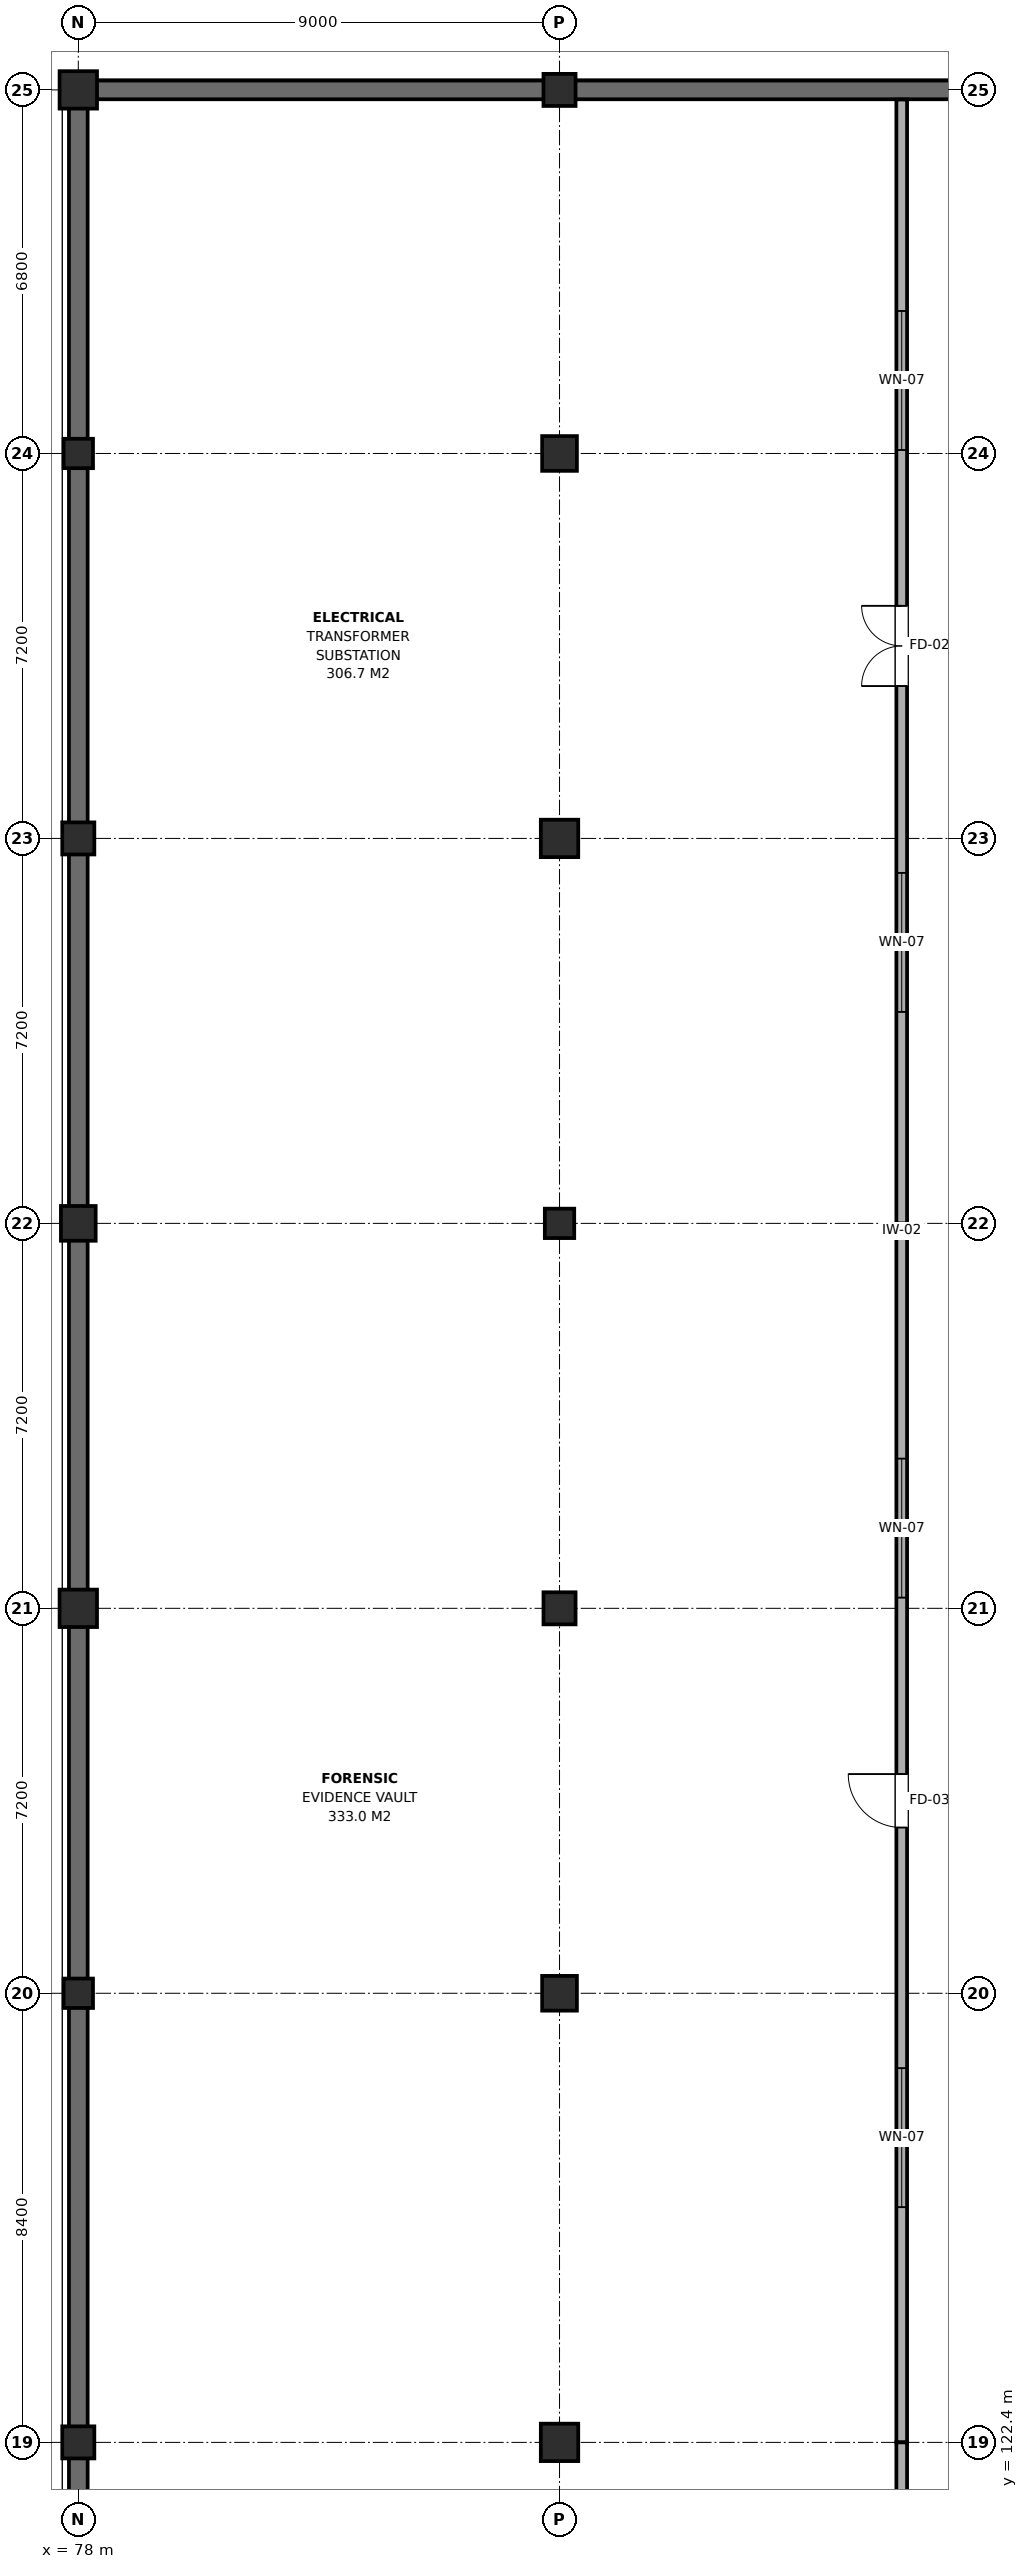
"""IFC4 building model, lengths in metres.
Left out: names, types, materials, properties, quantities, classifications, styles, units other than length and angle.
Written with IfcOpenShell. Run it as: python <this file> out.ifc"""

import sys

from ifc_helpers import new_model, si_unit, direction, frame, frame_2d, origin, origin_2d, place, context, subcontext, project, spatial, rectangle, extrude, element, fill, save


model = new_model("IFC4")
c1 = context("Model", 3, precision=1e-05, world=origin(), true_north=direction((0.0, 1.0)))
c2 = subcontext(c1, "Body", "Model", "MODEL_VIEW")
j1 = project(units=[si_unit("LENGTHUNIT", "METRE"), si_unit("PLANEANGLEUNIT", "RADIAN")], contexts=[c1])
p1 = place(None, origin())
s1 = spatial("IfcSite", under=j1, at=p1, CompositionType="ELEMENT")
p2 = place(p1, origin())
s2 = spatial("IfcBuilding", under=s1, at=p2, CompositionType="ELEMENT")
p3 = place(p2, frame((0.0, 0.0, -4.2)))
s3 = spatial("IfcBuildingStorey", under=s2, at=p3, CompositionType="ELEMENT", Elevation=-4.2)
p4 = place(p3, frame((78.0, 122.4, 0.0), z_axis=(0.0, 0.0, 1.0), x_axis=(1.0, 0.0, 0.0)))
e1 = element("IfcColumn", 1, at=p4, inside=s3, PredefinedType="COLUMN", context=c2, shape_type="SweptSolid", body=[
    extrude(rectangle(XDim=0.6, YDim=0.6, at=origin_2d()), origin(), (0.0, 0.0, 1.0), 4.2),
])
p5 = place(p3, frame((78.0, 130.8, 0.0), z_axis=(0.0, 0.0, 1.0), x_axis=(1.0, 0.0, 0.0)))
e2 = element("IfcColumn", 2, at=p5, inside=s3, PredefinedType="COLUMN", context=c2, shape_type="SweptSolid", body=[
    extrude(rectangle(XDim=0.55, YDim=0.55, at=origin_2d()), origin(), (0.0, 0.0, 1.0), 4.2),
])
p6 = place(p3, frame((78.0, 138.0, 0.0), z_axis=(0.0, 0.0, 1.0), x_axis=(1.0, 0.0, 0.0)))
e3 = element("IfcColumn", 3, at=p6, inside=s3, PredefinedType="COLUMN", context=c2, shape_type="SweptSolid", body=[
    extrude(rectangle(XDim=0.7, YDim=0.7, at=origin_2d()), origin(), (0.0, 0.0, 1.0), 4.2),
])
p7 = place(p3, frame((78.0, 145.2, 0.0), z_axis=(0.0, 0.0, 1.0), x_axis=(1.0, 0.0, 0.0)))
e4 = element("IfcColumn", 4, at=p7, inside=s3, PredefinedType="COLUMN", context=c2, shape_type="SweptSolid", body=[
    extrude(rectangle(XDim=0.65, YDim=0.65, at=origin_2d()), origin(), (0.0, 0.0, 1.0), 4.2),
])
p8 = place(p3, frame((78.0, 152.4, 0.0), z_axis=(0.0, 0.0, 1.0), x_axis=(1.0, 0.0, 0.0)))
e5 = element("IfcColumn", 5, at=p8, inside=s3, PredefinedType="COLUMN", context=c2, shape_type="SweptSolid", body=[
    extrude(rectangle(XDim=0.6, YDim=0.6, at=origin_2d()), origin(), (0.0, 0.0, 1.0), 4.2),
])
p9 = place(p3, frame((78.0, 159.6, 0.0), z_axis=(0.0, 0.0, 1.0), x_axis=(1.0, 0.0, 0.0)))
e6 = element("IfcColumn", 6, at=p9, inside=s3, PredefinedType="COLUMN", context=c2, shape_type="SweptSolid", body=[
    extrude(rectangle(XDim=0.55, YDim=0.55, at=origin_2d()), origin(), (0.0, 0.0, 1.0), 4.2),
])
for number, where, z_axis, x_axis in (
    (7, (78.0, 166.4, 0.0), (0.0, 0.0, 1.0), (1.0, 0.0, 0.0)),
    (8, (87.0, 122.4, 0.0), (0.0, 0.0, 1.0), (1.0, 0.0, 0.0)),
):
    element("IfcColumn", number, at=place(p3, frame(where, z_axis=z_axis, x_axis=x_axis)), inside=s3, PredefinedType="COLUMN", context=c2, shape_type="SweptSolid", body=[
        extrude(rectangle(XDim=0.7, YDim=0.7, at=origin_2d()), origin(), (0.0, 0.0, 1.0), 4.2),
    ])
p10 = place(p3, frame((87.0, 130.8, 0.0), z_axis=(0.0, 0.0, 1.0), x_axis=(1.0, 0.0, 0.0)))
e9 = element("IfcColumn", 9, at=p10, inside=s3, PredefinedType="COLUMN", context=c2, shape_type="SweptSolid", body=[
    extrude(rectangle(XDim=0.65, YDim=0.65, at=origin_2d()), origin(), (0.0, 0.0, 1.0), 4.2),
])
p11 = place(p3, frame((87.0, 138.0, 0.0), z_axis=(0.0, 0.0, 1.0), x_axis=(1.0, 0.0, 0.0)))
e10 = element("IfcColumn", 10, at=p11, inside=s3, PredefinedType="COLUMN", context=c2, shape_type="SweptSolid", body=[
    extrude(rectangle(XDim=0.6, YDim=0.6, at=origin_2d()), origin(), (0.0, 0.0, 1.0), 4.2),
])
p12 = place(p3, frame((87.0, 145.2, 0.0), z_axis=(0.0, 0.0, 1.0), x_axis=(1.0, 0.0, 0.0)))
e11 = element("IfcColumn", 11, at=p12, inside=s3, PredefinedType="COLUMN", context=c2, shape_type="SweptSolid", body=[
    extrude(rectangle(XDim=0.55, YDim=0.55, at=origin_2d()), origin(), (0.0, 0.0, 1.0), 4.2),
])
p13 = place(p3, frame((87.0, 152.4, 0.0), z_axis=(0.0, 0.0, 1.0), x_axis=(1.0, 0.0, 0.0)))
e12 = element("IfcColumn", 12, at=p13, inside=s3, PredefinedType="COLUMN", context=c2, shape_type="SweptSolid", body=[
    extrude(rectangle(XDim=0.7, YDim=0.7, at=origin_2d()), origin(), (0.0, 0.0, 1.0), 4.2),
])
p14 = place(p3, frame((87.0, 159.6, 0.0), z_axis=(0.0, 0.0, 1.0), x_axis=(1.0, 0.0, 0.0)))
e13 = element("IfcColumn", 13, at=p14, inside=s3, PredefinedType="COLUMN", context=c2, shape_type="SweptSolid", body=[
    extrude(rectangle(XDim=0.65, YDim=0.65, at=origin_2d()), origin(), (0.0, 0.0, 1.0), 4.2),
])
p15 = place(p3, frame((87.0, 166.4, 0.0), z_axis=(0.0, 0.0, 1.0), x_axis=(1.0, 0.0, 0.0)))
e14 = element("IfcColumn", 14, at=p15, inside=s3, PredefinedType="COLUMN", context=c2, shape_type="SweptSolid", body=[
    extrude(rectangle(XDim=0.6, YDim=0.6, at=origin_2d()), origin(), (0.0, 0.0, 1.0), 4.2),
])
p16 = place(p3, frame((113.775, 166.4, 0.0), z_axis=(0.0, 0.0, 1.0), x_axis=(-1.0, 0.0, 0.0)))
e15 = element("IfcWall", 15, at=p16, inside=s3, PredefinedType="USERDEFINED", context=c2, shape_type="SweptSolid", body=[
    extrude(rectangle(XDim=35.95, YDim=0.35, at=frame_2d((17.975, 0.0))), origin(), (0.0, 0.0, 1.0), 3.92),
])
p17 = place(p3, frame((78.0, 166.225, 0.0), z_axis=(0.0, 0.0, 1.0), x_axis=(0.0, -1.0, 0.0)))
e16 = element("IfcWall", 16, at=p17, inside=s3, PredefinedType="USERDEFINED", context=c2, shape_type="SweptSolid", body=[
    extrude(rectangle(XDim=61.65, YDim=0.35, at=frame_2d((30.825, 0.0))), origin(), (0.0, 0.0, 1.0), 3.92),
])
p18 = place(p3, frame((93.4, 122.4, 0.0), z_axis=(0.0, 0.0, 1.0), x_axis=(0.0, 1.0, 0.0)))
e17 = element("IfcWall", 17, at=p18, inside=s3, PredefinedType="PARTITIONING", context=c2, shape_type="SweptSolid", body=[
    extrude(rectangle(XDim=22.8, YDim=0.2, at=frame_2d((11.4, 0.0))), origin(), (0.0, 0.0, 1.0), 3.115),
])
p19 = place(p18, frame((11.5, 0.0, 0.0)))
e18 = element("IfcOpeningElement", 18, at=p19, cuts=e17, PredefinedType="OPENING", context=c2, shape_type="SweptSolid", body=[
    extrude(rectangle(XDim=1.0, YDim=2.15, at=frame_2d((0.5, 1.075))), frame((0.0, 0.115, 0.0), z_axis=(0.0, -1.0, 0.0), x_axis=(1.0, 0.0, 0.0)), (0.0, 0.0, 1.0), 0.23),
])
p20 = place(p18, frame((4.4, 0.0, 0.95)))
e19 = element("IfcOpeningElement", 19, at=p20, cuts=e17, PredefinedType="OPENING", context=c2, shape_type="SweptSolid", body=[
    extrude(rectangle(XDim=2.6, YDim=1.5, at=frame_2d((1.3, 0.75))), frame((0.0, 0.115, 0.0), z_axis=(0.0, -1.0, 0.0), x_axis=(1.0, 0.0, 0.0)), (0.0, 0.0, 1.0), 0.23),
])
p21 = place(p18, frame((15.8, 0.0, 0.95)))
e20 = element("IfcOpeningElement", 20, at=p21, cuts=e17, PredefinedType="OPENING", context=c2, shape_type="SweptSolid", body=[
    extrude(rectangle(XDim=2.6, YDim=1.5, at=frame_2d((1.3, 0.75))), frame((0.0, 0.115, 0.0), z_axis=(0.0, -1.0, 0.0), x_axis=(1.0, 0.0, 0.0)), (0.0, 0.0, 1.0), 0.23),
])
p22 = place(p3, frame((93.4, 145.2, 0.0), z_axis=(0.0, 0.0, 1.0), x_axis=(0.0, 1.0, 0.0)))
e21 = element("IfcWall", 21, at=p22, inside=s3, PredefinedType="PARTITIONING", context=c2, shape_type="SweptSolid", body=[
    extrude(rectangle(XDim=21.02, YDim=0.2, at=frame_2d((10.51, 0.0))), origin(), (0.0, 0.0, 1.0), 3.115),
])
p23 = place(p22, frame((10.05, 0.0, 0.0)))
e22 = element("IfcOpeningElement", 22, at=p23, cuts=e21, PredefinedType="OPENING", context=c2, shape_type="SweptSolid", body=[
    extrude(rectangle(XDim=1.5, YDim=2.15, at=frame_2d((0.75, 1.075))), frame((0.0, 0.115, 0.0), z_axis=(0.0, -1.0, 0.0), x_axis=(1.0, 0.0, 0.0)), (0.0, 0.0, 1.0), 0.23),
])
p24 = place(p22, frame((3.955, 0.0, 0.95)))
e23 = element("IfcOpeningElement", 23, at=p24, cuts=e21, PredefinedType="OPENING", context=c2, shape_type="SweptSolid", body=[
    extrude(rectangle(XDim=2.6, YDim=1.5, at=frame_2d((1.3, 0.75))), frame((0.0, 0.115, 0.0), z_axis=(0.0, -1.0, 0.0), x_axis=(1.0, 0.0, 0.0)), (0.0, 0.0, 1.0), 0.23),
])
p25 = place(p22, frame((14.465, 0.0, 0.95)))
e24 = element("IfcOpeningElement", 24, at=p25, cuts=e21, PredefinedType="OPENING", context=c2, shape_type="SweptSolid", body=[
    extrude(rectangle(XDim=2.6, YDim=1.5, at=frame_2d((1.3, 0.75))), frame((0.0, 0.115, 0.0), z_axis=(0.0, -1.0, 0.0), x_axis=(1.0, 0.0, 0.0)), (0.0, 0.0, 1.0), 0.23),
])
p26 = place(p3, frame((93.4, 105.0, 0.0), z_axis=(0.0, 0.0, 1.0), x_axis=(0.0, 1.0, 0.0)))
e25 = element("IfcWall", 25, at=p26, inside=s3, PredefinedType="PARTITIONING", context=c2, shape_type="SweptSolid", body=[
    extrude(rectangle(XDim=17.4, YDim=0.2, at=frame_2d((8.7, 0.0))), origin(), (0.0, 0.0, 1.0), 3.115),
])
p27 = place(p26, frame((12.15, 0.0, 0.0)))
e26 = element("IfcOpeningElement", 26, at=p27, cuts=e25, PredefinedType="OPENING", context=c2, shape_type="SweptSolid", body=[
    extrude(rectangle(XDim=1.5, YDim=2.15, at=frame_2d((0.75, 1.075))), frame((0.0, 0.115, 0.0), z_axis=(0.0, -1.0, 0.0), x_axis=(1.0, 0.0, 0.0)), (0.0, 0.0, 1.0), 0.23),
])
p28 = place(p26, frame((3.05, 0.0, 0.95)))
e27 = element("IfcOpeningElement", 27, at=p28, cuts=e25, PredefinedType="OPENING", context=c2, shape_type="SweptSolid", body=[
    extrude(rectangle(XDim=2.6, YDim=1.5, at=frame_2d((1.3, 0.75))), frame((0.0, 0.115, 0.0), z_axis=(0.0, -1.0, 0.0), x_axis=(1.0, 0.0, 0.0)), (0.0, 0.0, 1.0), 0.23),
])
p29 = place(p19, origin())
e28 = element("IfcDoor", 28, at=p29, inside=s3, OperationType="SINGLE_SWING_RIGHT", PredefinedType="DOOR", context=c2, shape_type="SweptSolid", body=[
    extrude(rectangle(XDim=1.0, YDim=2.15, at=frame_2d((0.5, 1.075))), frame((0.0, 0.025, 0.0), z_axis=(0.0, -1.0, 0.0), x_axis=(1.0, 0.0, 0.0)), (0.0, 0.0, 1.0), 0.05),
])
fill(e18, e28)
p30 = place(p20, origin())
e29 = element("IfcWindow", 29, at=p30, inside=s3, PartitioningType="SINGLE_PANEL", PredefinedType="WINDOW", context=c2, shape_type="SweptSolid", body=[
    extrude(rectangle(XDim=2.6, YDim=1.5, at=frame_2d((1.3, 0.75))), frame((0.0, 0.03, 0.0), z_axis=(0.0, -1.0, 0.0), x_axis=(1.0, 0.0, 0.0)), (0.0, 0.0, 1.0), 0.06),
])
fill(e19, e29)
p31 = place(p21, origin())
e30 = element("IfcWindow", 30, at=p31, inside=s3, PartitioningType="SINGLE_PANEL", PredefinedType="WINDOW", context=c2, shape_type="SweptSolid", body=[
    extrude(rectangle(XDim=2.6, YDim=1.5, at=frame_2d((1.3, 0.75))), frame((0.0, 0.03, 0.0), z_axis=(0.0, -1.0, 0.0), x_axis=(1.0, 0.0, 0.0)), (0.0, 0.0, 1.0), 0.06),
])
fill(e20, e30)
p32 = place(p23, origin())
e31 = element("IfcDoor", 31, at=p32, inside=s3, OperationType="DOUBLE_DOOR_SINGLE_SWING", PredefinedType="DOOR", context=c2, shape_type="SweptSolid", body=[
    extrude(rectangle(XDim=1.5, YDim=2.15, at=frame_2d((0.75, 1.075))), frame((0.0, 0.025, 0.0), z_axis=(0.0, -1.0, 0.0), x_axis=(1.0, 0.0, 0.0)), (0.0, 0.0, 1.0), 0.05),
])
fill(e22, e31)
p33 = place(p24, origin())
e32 = element("IfcWindow", 32, at=p33, inside=s3, PartitioningType="SINGLE_PANEL", PredefinedType="WINDOW", context=c2, shape_type="SweptSolid", body=[
    extrude(rectangle(XDim=2.6, YDim=1.5, at=frame_2d((1.3, 0.75))), frame((0.0, 0.03, 0.0), z_axis=(0.0, -1.0, 0.0), x_axis=(1.0, 0.0, 0.0)), (0.0, 0.0, 1.0), 0.06),
])
fill(e23, e32)
p34 = place(p25, origin())
e33 = element("IfcWindow", 33, at=p34, inside=s3, PartitioningType="SINGLE_PANEL", PredefinedType="WINDOW", context=c2, shape_type="SweptSolid", body=[
    extrude(rectangle(XDim=2.6, YDim=1.5, at=frame_2d((1.3, 0.75))), frame((0.0, 0.03, 0.0), z_axis=(0.0, -1.0, 0.0), x_axis=(1.0, 0.0, 0.0)), (0.0, 0.0, 1.0), 0.06),
])
fill(e24, e33)
save(model, sys.argv[1])
